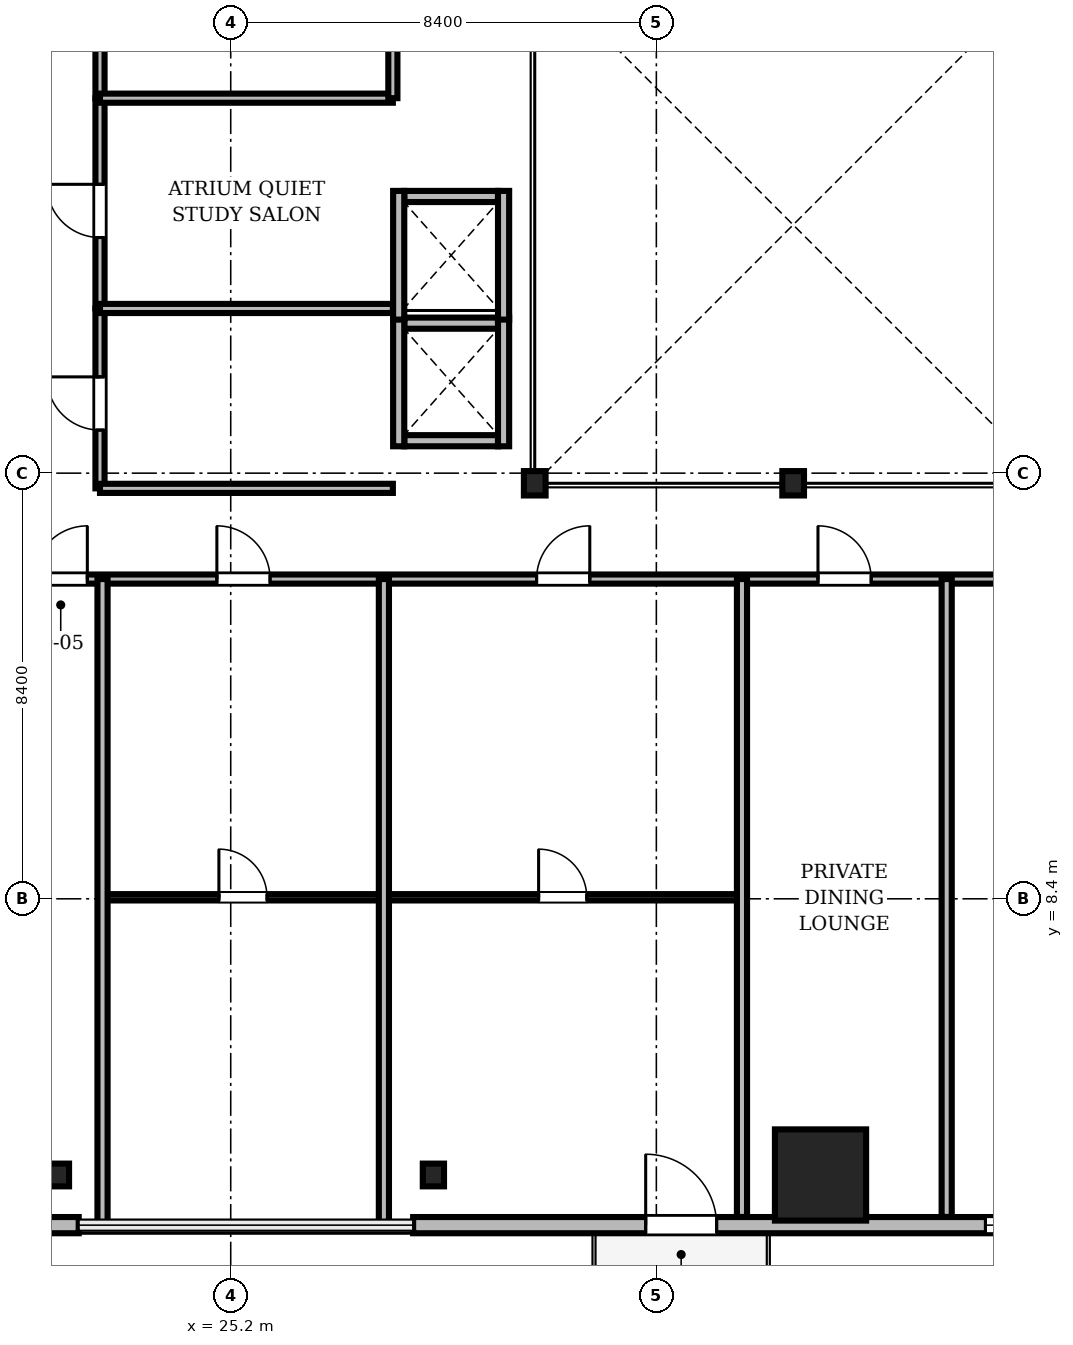
"""IFC4 building model, lengths in metres.
Left out: names, types, materials, properties, quantities, classifications, styles, units other than length and angle.
Written with IfcOpenShell. Run it as: python <this file> out.ifc"""

import sys

from ifc_helpers import new_model, si_unit, direction, frame, frame_2d, origin, origin_2d, place, context, subcontext, project, spatial, rectangle, i_section, extrude, source, transform, mapped, element, fill, save


model = new_model("IFC4")
c1 = context("Model", 3, precision=1e-05, world=origin(), true_north=direction((0.0, 1.0)))
c2 = subcontext(c1, "Body", "Model", "MODEL_VIEW")
j1 = project(units=[si_unit("LENGTHUNIT", "METRE"), si_unit("PLANEANGLEUNIT", "RADIAN")], contexts=[c1])
p1 = place(None, origin())
s1 = spatial("IfcSite", under=j1, at=p1, CompositionType="ELEMENT")
p2 = place(p1, origin())
s2 = spatial("IfcBuilding", under=s1, at=p2, CompositionType="ELEMENT")
p3 = place(p2, frame((0.0, 0.0, 67.75)))
s3 = spatial("IfcBuildingStorey", under=s2, at=p3, CompositionType="ELEMENT", Elevation=67.75)
m1 = source(origin(), c2, "Body", "SweptSolid", [
    extrude(i_section(OverallWidth=0.428, OverallDepth=0.481, WebThickness=0.04, FlangeThickness=0.063, FilletRadius=0.015, at=origin_2d()), origin(), (0.0, 0.0, 1.0), 3.41),
])
for number, where, z_axis, x_axis in (
    (1, (31.2, 16.6, 0.0), (0.0, 0.0, 1.0), (1.0, 0.0, 0.0)),
    (2, (36.3, 16.6, 0.0), (0.0, 0.0, 1.0), (1.0, 0.0, 0.0)),
):
    element("IfcColumn", number, at=place(p3, frame(where, z_axis=z_axis, x_axis=x_axis)), inside=s3, PredefinedType="COLUMN", context=c2, shape_type="MappedRepresentation", body=[
        mapped(m1, transform((0.0, 0.0, 0.0), scale=1.0)),
    ])
m2 = source(origin(), c2, "Body", "SweptSolid", [
    extrude(rectangle(XDim=1.8, YDim=1.8, at=origin_2d()), origin(), (0.0, 0.0, 1.0), 3.41),
])
p4 = place(p3, frame((36.84, 2.95, 0.0), z_axis=(0.0, 0.0, 1.0), x_axis=(1.0, 0.0, 0.0)))
e3 = element("IfcColumn", 3, at=p4, inside=s3, PredefinedType="COLUMN", context=c2, shape_type="MappedRepresentation", body=[
    mapped(m2, transform((0.0, 0.0, 0.0), scale=1.0)),
])
m3 = source(origin(), c2, "Body", "SweptSolid", [
    extrude(i_section(OverallWidth=0.419, OverallDepth=0.449, WebThickness=0.031, FlangeThickness=0.048, FilletRadius=0.015, at=origin_2d()), origin(), (0.0, 0.0, 1.0), 3.41),
])
for number, where, z_axis, x_axis in (
    (4, (21.8, 2.95, 0.0), (0.0, 0.0, 1.0), (1.0, 0.0, 0.0)),
    (5, (29.2, 2.95, 0.0), (0.0, 0.0, 1.0), (1.0, 0.0, 0.0)),
):
    element("IfcColumn", number, at=place(p3, frame(where, z_axis=z_axis, x_axis=x_axis)), inside=s3, PredefinedType="COLUMN", context=c2, shape_type="MappedRepresentation", body=[
        mapped(m3, transform((0.0, 0.0, 0.0), scale=1.0)),
    ])
m4 = source(origin(), c2, "Body", "SweptSolid", [
    extrude(rectangle(XDim=15.6, YDim=0.32, at=frame_2d((7.8, 0.0))), origin(), (0.0, 0.0, 1.0), 3.41),
])
p5 = place(p3, frame((6.6, 1.96, 0.0), z_axis=(0.0, 0.0, 1.0), x_axis=(1.0, 0.0, 0.0)))
e6 = element("IfcWall", 6, at=p5, inside=s3, PredefinedType="SOLIDWALL", context=c2, shape_type="MappedRepresentation", body=[
    mapped(m4, transform((0.0, 0.0, 0.0), scale=1.0)),
])
m5 = source(origin(), c2, "Body", "SweptSolid", [
    extrude(rectangle(XDim=2.2, YDim=2.4, at=frame_2d((1.1, 1.2))), frame((0.0, 0.17, 0.0), z_axis=(0.0, -1.0, 0.0), x_axis=(1.0, 0.0, 0.0)), (0.0, 0.0, 1.0), 0.34),
])
p6 = place(p5, frame((3.005, 0.0, 0.72)))
e7 = element("IfcOpeningElement", 7, at=p6, cuts=e6, PredefinedType="OPENING", context=c2, shape_type="MappedRepresentation", body=[
    mapped(m5, transform((0.0, 0.0, 0.0), scale=1.0)),
])
p7 = place(p3, frame((28.8, 1.96, 0.0), z_axis=(0.0, 0.0, 1.0), x_axis=(1.0, 0.0, 0.0)))
e8 = element("IfcWall", 8, at=p7, inside=s3, PredefinedType="SOLIDWALL", context=c2, shape_type="MappedRepresentation", body=[
    mapped(m4, transform((0.0, 0.0, 0.0), scale=1.0)),
])
m6 = source(origin(), c2, "Body", "SweptSolid", [
    extrude(rectangle(XDim=1.4, YDim=2.3, at=frame_2d((0.7, 1.15))), frame((0.0, 0.17, 0.0), z_axis=(0.0, -1.0, 0.0), x_axis=(1.0, 0.0, 0.0)), (0.0, 0.0, 1.0), 0.34),
])
p8 = place(p7, frame((4.59, 0.0, 0.0)))
e9 = element("IfcOpeningElement", 9, at=p8, cuts=e8, PredefinedType="OPENING", context=c2, shape_type="MappedRepresentation", body=[
    mapped(m6, transform((0.0, 0.0, 0.0), scale=1.0)),
])
p9 = place(p7, frame((11.295, 0.0, 0.72)))
e10 = element("IfcOpeningElement", 10, at=p9, cuts=e8, PredefinedType="OPENING", context=c2, shape_type="MappedRepresentation", body=[
    mapped(m5, transform((0.0, 0.0, 0.0), scale=1.0)),
])
m7 = source(origin(), c2, "Body", "SweptSolid", [
    extrude(rectangle(XDim=1.85, YDim=0.22, at=frame_2d((0.925, 0.0))), origin(), (0.0, 0.0, 1.0), 3.41),
])
for number, where, z_axis, x_axis in (
    (11, (28.625, 17.44, 0.0), (0.0, 0.0, 1.0), (1.0, 0.0, 0.0)),
    (12, (28.625, 19.76, 0.0), (0.0, 0.0, 1.0), (1.0, 0.0, 0.0)),
):
    element("IfcWall", number, at=place(p3, frame(where, z_axis=z_axis, x_axis=x_axis)), inside=s3, PredefinedType="SOLIDWALL", context=c2, shape_type="MappedRepresentation", body=[
        mapped(m7, transform((0.0, 0.0, 0.0), scale=1.0)),
    ])
m8 = source(origin(), c2, "Body", "SweptSolid", [
    extrude(rectangle(XDim=2.54, YDim=0.22, at=frame_2d((1.27, 0.0))), origin(), (0.0, 0.0, 1.0), 3.41),
])
for number, where, z_axis, x_axis in (
    (13, (28.515, 17.33, 0.0), (0.0, 0.0, 1.0), (0.0, 1.0, 0.0)),
    (14, (30.585, 17.33, 0.0), (0.0, 0.0, 1.0), (0.0, 1.0, 0.0)),
):
    element("IfcWall", number, at=place(p3, frame(where, z_axis=z_axis, x_axis=x_axis)), inside=s3, PredefinedType="SOLIDWALL", context=c2, shape_type="MappedRepresentation", body=[
        mapped(m8, transform((0.0, 0.0, 0.0), scale=1.0)),
    ])
p10 = place(p3, frame((28.625, 22.26, 0.0), z_axis=(0.0, 0.0, 1.0), x_axis=(1.0, 0.0, 0.0)))
e15 = element("IfcWall", 15, at=p10, inside=s3, PredefinedType="SOLIDWALL", context=c2, shape_type="MappedRepresentation", body=[
    mapped(m7, transform((0.0, 0.0, 0.0), scale=1.0)),
])
for number, where, z_axis, x_axis in (
    (16, (28.515, 19.83, 0.0), (0.0, 0.0, 1.0), (0.0, 1.0, 0.0)),
    (17, (30.585, 19.83, 0.0), (0.0, 0.0, 1.0), (0.0, 1.0, 0.0)),
):
    element("IfcWall", number, at=place(p3, frame(where, z_axis=z_axis, x_axis=x_axis)), inside=s3, PredefinedType="SOLIDWALL", context=c2, shape_type="MappedRepresentation", body=[
        mapped(m8, transform((0.0, 0.0, 0.0), scale=1.0)),
    ])
m9 = source(origin(), c2, "Body", "SweptSolid", [
    extrude(rectangle(XDim=46.156, YDim=0.18, at=frame_2d((23.078, 0.0))), origin(), (0.0, 0.0, 1.0), 2.652),
])
p11 = place(p3, frame((2.422, 14.71, 0.0), z_axis=(0.0, 0.0, 1.0), x_axis=(1.0, 0.0, 0.0)))
e18 = element("IfcWall", 18, at=p11, inside=s3, PredefinedType="PARTITIONING", context=c2, shape_type="MappedRepresentation", body=[
    mapped(m9, transform((0.0, 0.0, 0.0), scale=1.0)),
])
m10 = source(origin(), c2, "Body", "SweptSolid", [
    extrude(rectangle(XDim=1.05, YDim=2.2, at=frame_2d((0.525, 1.1))), frame((0.0, 0.1, 0.0), z_axis=(0.0, -1.0, 0.0), x_axis=(1.0, 0.0, 0.0)), (0.0, 0.0, 1.0), 0.2),
])
p12 = place(p11, frame((18.898, 0.0, 0.0)))
e19 = element("IfcOpeningElement", 19, at=p12, cuts=e18, PredefinedType="OPENING", context=c2, shape_type="MappedRepresentation", body=[
    mapped(m10, transform((0.0, 0.0, 0.0), scale=1.0)),
])
p13 = place(p11, frame((22.505, 0.0, 0.0)))
e20 = element("IfcOpeningElement", 20, at=p13, cuts=e18, PredefinedType="OPENING", context=c2, shape_type="MappedRepresentation", body=[
    mapped(m10, transform((0.0, 0.0, 0.0), scale=1.0)),
])
p14 = place(p11, frame((28.814, 0.0, 0.0)))
e21 = element("IfcOpeningElement", 21, at=p14, cuts=e18, PredefinedType="OPENING", context=c2, shape_type="MappedRepresentation", body=[
    mapped(m10, transform((0.0, 0.0, 0.0), scale=1.0)),
])
p15 = place(p11, frame((34.368, 0.0, 0.0)))
e22 = element("IfcOpeningElement", 22, at=p15, cuts=e18, PredefinedType="OPENING", context=c2, shape_type="MappedRepresentation", body=[
    mapped(m10, transform((0.0, 0.0, 0.0), scale=1.0)),
])
p16 = place(p11, frame((40.998, 0.0, 0.0)))
e23 = element("IfcOpeningElement", 23, at=p16, cuts=e18, PredefinedType="OPENING", context=c2, shape_type="MappedRepresentation", body=[
    mapped(m10, transform((0.0, 0.0, 0.0), scale=1.0)),
])
m11 = source(origin(), c2, "Body", "SweptSolid", [
    extrude(rectangle(XDim=7.067, YDim=0.125, at=frame_2d((3.534, 0.0))), origin(), (0.0, 0.0, 1.0), 2.802),
])
p17 = place(p3, frame((28.223, 8.43, 0.0), z_axis=(0.0, 0.0, 1.0), x_axis=(1.0, 0.0, 0.0)))
e24 = element("IfcWall", 24, at=p17, inside=s3, PredefinedType="PARTITIONING", context=c2, shape_type="MappedRepresentation", body=[
    mapped(m11, transform((0.0, 0.0, 0.0), scale=1.0)),
])
m12 = source(origin(), c2, "Body", "SweptSolid", [
    extrude(rectangle(XDim=0.95, YDim=2.15, at=frame_2d((0.475, 1.075))), frame((0.0, 0.073, 0.0), z_axis=(0.0, -1.0, 0.0), x_axis=(1.0, 0.0, 0.0)), (0.0, 0.0, 1.0), 0.145),
])
p18 = place(p17, frame((3.053, 0.0, 0.0)))
e25 = element("IfcOpeningElement", 25, at=p18, cuts=e24, PredefinedType="OPENING", context=c2, shape_type="MappedRepresentation", body=[
    mapped(m12, transform((0.0, 0.0, 0.0), scale=1.0)),
])
m13 = source(origin(), c2, "Body", "SweptSolid", [
    extrude(rectangle(XDim=5.553, YDim=0.125, at=frame_2d((2.776, 0.0))), origin(), (0.0, 0.0, 1.0), 2.802),
])
p19 = place(p3, frame((22.67, 8.43, 0.0), z_axis=(0.0, 0.0, 1.0), x_axis=(1.0, 0.0, 0.0)))
e26 = element("IfcWall", 26, at=p19, inside=s3, PredefinedType="PARTITIONING", context=c2, shape_type="MappedRepresentation", body=[
    mapped(m13, transform((0.0, 0.0, 0.0), scale=1.0)),
])
p20 = place(p19, frame((2.297, 0.0, 0.0)))
e27 = element("IfcOpeningElement", 27, at=p20, cuts=e26, PredefinedType="OPENING", context=c2, shape_type="MappedRepresentation", body=[
    mapped(m12, transform((0.0, 0.0, 0.0), scale=1.0)),
])
m14 = source(origin(), c2, "Body", "SweptSolid", [
    extrude(rectangle(XDim=4.24, YDim=0.18, at=frame_2d((2.12, 0.0))), origin(), (0.0, 0.0, 1.0), 2.802),
])
p21 = place(p3, frame((22.62, 24.2, 0.0), z_axis=(0.0, 0.0, 1.0), x_axis=(0.0, 1.0, 0.0)))
e28 = element("IfcWall", 28, at=p21, inside=s3, PredefinedType="PARTITIONING", context=c2, shape_type="MappedRepresentation", body=[
    mapped(m14, transform((0.0, 0.0, 0.0), scale=1.0)),
])
p22 = place(p21, frame((1.4, 0.0, 0.0)))
e29 = element("IfcOpeningElement", 29, at=p22, cuts=e28, PredefinedType="OPENING", context=c2, shape_type="MappedRepresentation", body=[
    mapped(m10, transform((0.0, 0.0, 0.0), scale=1.0)),
])
m15 = source(origin(), c2, "Body", "SweptSolid", [
    extrude(rectangle(XDim=4.15, YDim=0.18, at=frame_2d((2.075, 0.0))), origin(), (0.0, 0.0, 1.0), 3.042),
])
p23 = place(p3, frame((22.62, 20.05, 0.0), z_axis=(0.0, 0.0, 1.0), x_axis=(0.0, 1.0, 0.0)))
e30 = element("IfcWall", 30, at=p23, inside=s3, PredefinedType="PARTITIONING", context=c2, shape_type="MappedRepresentation", body=[
    mapped(m15, transform((0.0, 0.0, 0.0), scale=1.0)),
])
p24 = place(p23, frame((1.4, 0.0, 0.0)))
e31 = element("IfcOpeningElement", 31, at=p24, cuts=e30, PredefinedType="OPENING", context=c2, shape_type="MappedRepresentation", body=[
    mapped(m10, transform((0.0, 0.0, 0.0), scale=1.0)),
])
m16 = source(origin(), c2, "Body", "SweptSolid", [
    extrude(rectangle(XDim=3.55, YDim=0.18, at=frame_2d((1.775, 0.0))), origin(), (0.0, 0.0, 1.0), 2.802),
])
p25 = place(p3, frame((22.62, 16.5, 0.0), z_axis=(0.0, 0.0, 1.0), x_axis=(0.0, 1.0, 0.0)))
e32 = element("IfcWall", 32, at=p25, inside=s3, PredefinedType="PARTITIONING", context=c2, shape_type="MappedRepresentation", body=[
    mapped(m16, transform((0.0, 0.0, 0.0), scale=1.0)),
])
p26 = place(p25, frame((1.15, 0.0, 0.0)))
e33 = element("IfcOpeningElement", 33, at=p26, cuts=e32, PredefinedType="OPENING", context=c2, shape_type="MappedRepresentation", body=[
    mapped(m10, transform((0.0, 0.0, 0.0), scale=1.0)),
])
m17 = source(origin(), c2, "Body", "SweptSolid", [
    extrude(rectangle(XDim=12.78, YDim=0.2, at=frame_2d((6.39, 0.0))), origin(), (0.0, 0.0, 1.0), 2.652),
])
for number, where, z_axis, x_axis in (
    (34, (22.67, 1.93, 0.0), (0.0, 0.0, 1.0), (0.0, 1.0, 0.0)),
    (35, (28.223, 1.93, 0.0), (0.0, 0.0, 1.0), (0.0, 1.0, 0.0)),
):
    element("IfcWall", number, at=place(p3, frame(where, z_axis=z_axis, x_axis=x_axis)), inside=s3, PredefinedType="PARTITIONING", context=c2, shape_type="MappedRepresentation", body=[
        mapped(m17, transform((0.0, 0.0, 0.0), scale=1.0)),
    ])
m18 = source(origin(), c2, "Body", "SweptSolid", [
    extrude(rectangle(XDim=12.588, YDim=0.2, at=frame_2d((6.294, 0.0))), origin(), (0.0, 0.0, 1.0), 2.652),
])
for number, where, z_axis, x_axis in (
    (36, (35.29, 2.122, 0.0), (0.0, 0.0, 1.0), (0.0, 1.0, 0.0)),
    (37, (39.33, 2.122, 0.0), (0.0, 0.0, 1.0), (0.0, 1.0, 0.0)),
):
    element("IfcWall", number, at=place(p3, frame(where, z_axis=z_axis, x_axis=x_axis)), inside=s3, PredefinedType="PARTITIONING", context=c2, shape_type="MappedRepresentation", body=[
        mapped(m18, transform((0.0, 0.0, 0.0), scale=1.0)),
    ])
m19 = source(origin(), c2, "Body", "SweptSolid", [
    extrude(rectangle(XDim=5.78, YDim=0.18, at=frame_2d((2.89, 0.0))), origin(), (0.0, 0.0, 1.0), 2.802),
])
p27 = place(p3, frame((22.62, 16.5, 0.0), z_axis=(0.0, 0.0, 1.0), x_axis=(1.0, 0.0, 0.0)))
e38 = element("IfcWall", 38, at=p27, inside=s3, PredefinedType="PARTITIONING", context=c2, shape_type="MappedRepresentation", body=[
    mapped(m19, transform((0.0, 0.0, 0.0), scale=1.0)),
])
m20 = source(origin(), c2, "Body", "SweptSolid", [
    extrude(rectangle(XDim=5.78, YDim=0.18, at=frame_2d((2.89, 0.0))), origin(), (0.0, 0.0, 1.0), 3.41),
])
for number, where, z_axis, x_axis in (
    (39, (22.62, 20.05, 0.0), (0.0, 0.0, 1.0), (1.0, 0.0, 0.0)),
    (40, (22.62, 24.2, 0.0), (0.0, 0.0, 1.0), (1.0, 0.0, 0.0)),
):
    element("IfcWall", number, at=place(p3, frame(where, z_axis=z_axis, x_axis=x_axis)), inside=s3, PredefinedType="PARTITIONING", context=c2, shape_type="MappedRepresentation", body=[
        mapped(m20, transform((0.0, 0.0, 0.0), scale=1.0)),
    ])
p28 = place(p3, frame((28.4, 24.2, 0.0), z_axis=(0.0, 0.0, 1.0), x_axis=(0.0, 1.0, 0.0)))
e41 = element("IfcWall", 41, at=p28, inside=s3, PredefinedType="PARTITIONING", context=c2, shape_type="MappedRepresentation", body=[
    mapped(m14, transform((0.0, 0.0, 0.0), scale=1.0)),
])
m21 = source(origin(), c2, "Body", "SweptSolid", [
    extrude(rectangle(XDim=1.4, YDim=2.3, at=frame_2d((0.7, 1.15))), frame((0.0, 0.025, 0.0), z_axis=(0.0, -1.0, 0.0), x_axis=(1.0, 0.0, 0.0)), (0.0, 0.0, 1.0), 0.05),
])
p29 = place(p8, frame((1.4, 0.0, 0.0), z_axis=(0.0, 0.0, 1.0), x_axis=(-1.0, 0.0, 0.0)))
e42 = element("IfcDoor", 42, at=p29, inside=s3, OperationType="DOUBLE_DOOR_SLIDING", PredefinedType="DOOR", context=c2, shape_type="MappedRepresentation", body=[
    mapped(m21, transform((0.0, 0.0, 0.0), scale=1.0)),
])
fill(e9, e42)
m22 = source(origin(), c2, "Body", "SweptSolid", [
    extrude(rectangle(XDim=2.2, YDim=2.4, at=frame_2d((1.1, 1.2))), frame((0.0, 0.03, 0.0), z_axis=(0.0, -1.0, 0.0), x_axis=(1.0, 0.0, 0.0)), (0.0, 0.0, 1.0), 0.06),
])
p30 = place(p9, origin())
e43 = element("IfcWindow", 43, at=p30, inside=s3, PartitioningType="SINGLE_PANEL", PredefinedType="WINDOW", context=c2, shape_type="MappedRepresentation", body=[
    mapped(m22, transform((0.0, 0.0, 0.0), scale=1.0)),
])
fill(e10, e43)
m23 = source(origin(), c2, "Body", "SweptSolid", [
    extrude(rectangle(XDim=1.05, YDim=2.2, at=frame_2d((0.525, 1.1))), frame((0.0, 0.025, 0.0), z_axis=(0.0, -1.0, 0.0), x_axis=(1.0, 0.0, 0.0)), (0.0, 0.0, 1.0), 0.05),
])
p31 = place(p12, origin())
e44 = element("IfcDoor", 44, at=p31, inside=s3, OperationType="SINGLE_SWING_RIGHT", PredefinedType="DOOR", context=c2, shape_type="MappedRepresentation", body=[
    mapped(m23, transform((0.0, 0.0, 0.0), scale=1.0)),
])
fill(e19, e44)
p32 = place(p13, origin())
e45 = element("IfcDoor", 45, at=p32, inside=s3, OperationType="SINGLE_SWING_LEFT", PredefinedType="DOOR", context=c2, shape_type="MappedRepresentation", body=[
    mapped(m23, transform((0.0, 0.0, 0.0), scale=1.0)),
])
fill(e20, e45)
p33 = place(p14, origin())
e46 = element("IfcDoor", 46, at=p33, inside=s3, OperationType="SINGLE_SWING_RIGHT", PredefinedType="DOOR", context=c2, shape_type="MappedRepresentation", body=[
    mapped(m23, transform((0.0, 0.0, 0.0), scale=1.0)),
])
fill(e21, e46)
p34 = place(p15, origin())
e47 = element("IfcDoor", 47, at=p34, inside=s3, OperationType="SINGLE_SWING_LEFT", PredefinedType="DOOR", context=c2, shape_type="MappedRepresentation", body=[
    mapped(m23, transform((0.0, 0.0, 0.0), scale=1.0)),
])
fill(e22, e47)
m24 = source(origin(), c2, "Body", "SweptSolid", [
    extrude(rectangle(XDim=0.95, YDim=2.15, at=frame_2d((0.475, 1.075))), frame((0.0, 0.025, 0.0), z_axis=(0.0, -1.0, 0.0), x_axis=(1.0, 0.0, 0.0)), (0.0, 0.0, 1.0), 0.05),
])
p35 = place(p18, origin())
e48 = element("IfcDoor", 48, at=p35, inside=s3, OperationType="SINGLE_SWING_LEFT", PredefinedType="DOOR", context=c2, shape_type="MappedRepresentation", body=[
    mapped(m24, transform((0.0, 0.0, 0.0), scale=1.0)),
])
fill(e25, e48)
p36 = place(p20, origin())
e49 = element("IfcDoor", 49, at=p36, inside=s3, OperationType="SINGLE_SWING_LEFT", PredefinedType="DOOR", context=c2, shape_type="MappedRepresentation", body=[
    mapped(m24, transform((0.0, 0.0, 0.0), scale=1.0)),
])
fill(e27, e49)
p37 = place(p24, origin())
e50 = element("IfcDoor", 50, at=p37, inside=s3, OperationType="SINGLE_SWING_RIGHT", PredefinedType="DOOR", context=c2, shape_type="MappedRepresentation", body=[
    mapped(m23, transform((0.0, 0.0, 0.0), scale=1.0)),
])
fill(e31, e50)
p38 = place(p26, origin())
e51 = element("IfcDoor", 51, at=p38, inside=s3, OperationType="SINGLE_SWING_RIGHT", PredefinedType="DOOR", context=c2, shape_type="MappedRepresentation", body=[
    mapped(m23, transform((0.0, 0.0, 0.0), scale=1.0)),
])
fill(e33, e51)
save(model, sys.argv[1])
